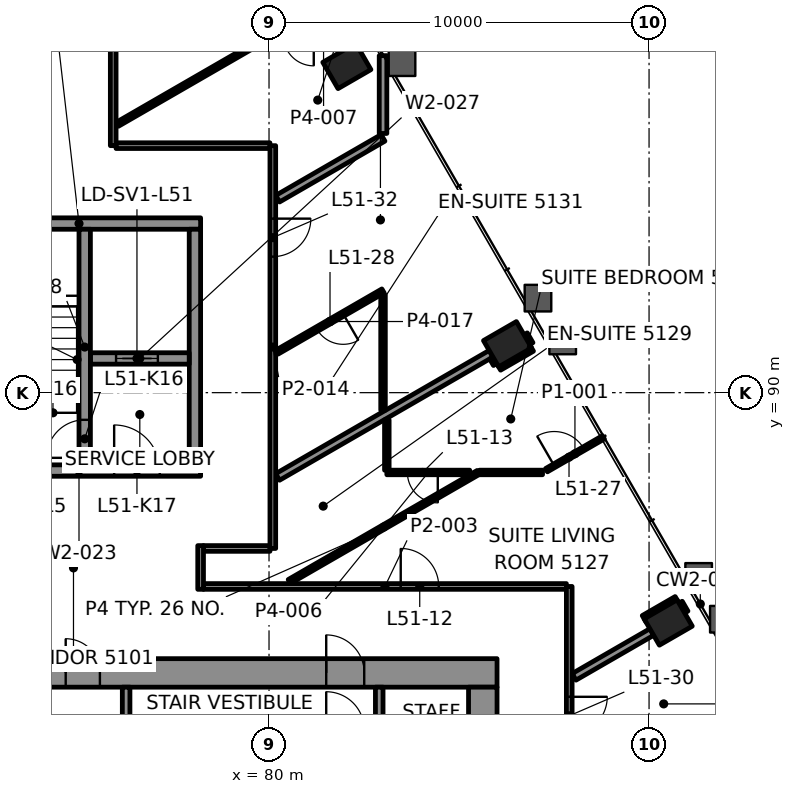
"""IFC4 building model, lengths in metres.
Left out: names, types, materials, properties, quantities, classifications, styles, units other than length and angle.
Written with IfcOpenShell. Run it as: python <this file> out.ifc"""

import sys

from ifc_helpers import new_model, si_unit, direction, frame, frame_2d, origin, origin_2d, place, context, subcontext, project, spatial, rectangle, hollow_rectangle, extrude, element, fill, save


model = new_model("IFC4")
c1 = context("Model", 3, precision=1e-05, world=origin(), true_north=direction((0.0, 1.0)))
c2 = subcontext(c1, "Body", "Model", "MODEL_VIEW")
j1 = project(units=[si_unit("LENGTHUNIT", "METRE"), si_unit("PLANEANGLEUNIT", "RADIAN")], contexts=[c1])
p1 = place(None, origin())
s1 = spatial("IfcSite", under=j1, at=p1, CompositionType="ELEMENT")
p2 = place(p1, origin())
s2 = spatial("IfcBuilding", under=s1, at=p2, CompositionType="ELEMENT")
p3 = place(p2, frame((0.0, 0.0, 218.2)))
s3 = spatial("IfcBuildingStorey", under=s2, at=p3, CompositionType="ELEMENT", Elevation=218.2)
for number, where, z_axis, x_axis in (
    (1, (90.504, 83.951, -0.0), (0.0, 0.0, 1.0), (-0.5, 0.866, 0.0)),
    (2, (86.276, 91.274, -0.0), (0.0, 0.0, 1.0), (-0.5, 0.866, 0.0)),
    (3, (82.048, 98.597, -0.0), (0.0, 0.0, 1.0), (-0.5, 0.866, 0.0)),
):
    element("IfcColumn", number, at=place(p3, frame(where, z_axis=z_axis, x_axis=x_axis)), inside=s3, PredefinedType="COLUMN", context=c2, shape_type="SweptSolid", body=[
        extrude(hollow_rectangle(XDim=0.8, YDim=1.0, WallThickness=0.05, at=origin_2d()), origin(), (0.0, 0.0, 1.0), 3.9),
    ])
p4 = place(p3, frame((64.0, 82.625, 0.0), z_axis=(0.0, 0.0, 1.0), x_axis=(1.0, 0.0, 0.0)))
e4 = element("IfcWall", 4, at=p4, inside=s3, PredefinedType="SHEAR", context=c2, shape_type="SweptSolid", body=[
    extrude(rectangle(XDim=22.0, YDim=0.75, at=frame_2d((11.0, 0.0))), origin(), (0.0, 0.0, 1.0), 3.7),
])
p5 = place(p4, frame((3.695, 0.0, 0.0)))
e5 = element("IfcOpeningElement", 5, at=p5, cuts=e4, PredefinedType="OPENING", context=c2, shape_type="SweptSolid", body=[
    extrude(rectangle(XDim=1.0, YDim=2.1, at=frame_2d((0.5, 1.05))), frame((0.0, 0.385, 0.0), z_axis=(0.0, -1.0, 0.0), x_axis=(1.0, 0.0, 0.0)), (0.0, 0.0, 1.0), 0.77),
])
p6 = place(p4, frame((17.505, 0.0, 0.0)))
e6 = element("IfcOpeningElement", 6, at=p6, cuts=e4, PredefinedType="OPENING", context=c2, shape_type="SweptSolid", body=[
    extrude(rectangle(XDim=1.0, YDim=2.1, at=frame_2d((0.5, 1.05))), frame((0.0, 0.385, 0.0), z_axis=(0.0, -1.0, 0.0), x_axis=(1.0, 0.0, 0.0)), (0.0, 0.0, 1.0), 0.77),
])
p7 = place(p4, frame((10.65, 0.0, 0.0)))
e7 = element("IfcOpeningElement", 7, at=p7, cuts=e4, PredefinedType="OPENING", context=c2, shape_type="SweptSolid", body=[
    extrude(rectangle(XDim=0.9, YDim=2.1, at=frame_2d((0.45, 1.05))), frame((0.0, 0.385, 0.0), z_axis=(0.0, -1.0, 0.0), x_axis=(1.0, 0.0, 0.0)), (0.0, 0.0, 1.0), 0.77),
])
p8 = place(p3, frame((85.625, 67.75, 0.0), z_axis=(0.0, 0.0, 1.0), x_axis=(0.0, 1.0, 0.0)))
e8 = element("IfcWall", 8, at=p8, inside=s3, PredefinedType="SHEAR", context=c2, shape_type="SweptSolid", body=[
    extrude(rectangle(XDim=14.5, YDim=0.75, at=frame_2d((7.25, 0.0))), origin(), (0.0, 0.0, 1.0), 3.7),
])
p9 = place(p8, frame((4.65, 0.0, 0.0)))
e9 = element("IfcOpeningElement", 9, at=p9, cuts=e8, PredefinedType="OPENING", context=c2, shape_type="SweptSolid", body=[
    extrude(rectangle(XDim=1.8, YDim=2.1, at=frame_2d((0.9, 1.05))), frame((0.0, 0.385, 0.0), z_axis=(0.0, -1.0, 0.0), x_axis=(1.0, 0.0, 0.0)), (0.0, 0.0, 1.0), 0.77),
])
p10 = place(p8, frame((11.8, 0.0, 0.0)))
e10 = element("IfcOpeningElement", 10, at=p10, cuts=e8, PredefinedType="OPENING", context=c2, shape_type="SweptSolid", body=[
    extrude(rectangle(XDim=0.9, YDim=2.1, at=frame_2d((0.45, 1.05))), frame((0.0, 0.385, 0.0), z_axis=(0.0, -1.0, 0.0), x_axis=(1.0, 0.0, 0.0)), (0.0, 0.0, 1.0), 0.77),
])
p11 = place(p3, frame((71.8, 87.95, 0.0), z_axis=(0.0, 0.0, 1.0), x_axis=(1.0, 0.0, 0.0)))
e11 = element("IfcWall", 11, at=p11, inside=s3, PredefinedType="SHEAR", context=c2, shape_type="SweptSolid", body=[
    extrude(rectangle(XDim=6.4, YDim=0.3, at=frame_2d((3.2, 0.0))), origin(), (0.0, 0.0, 1.0), 3.7),
])
p12 = place(p11, frame((1.325, 0.0, 0.0)))
e12 = element("IfcOpeningElement", 12, at=p12, cuts=e11, PredefinedType="OPENING", context=c2, shape_type="SweptSolid", body=[
    extrude(rectangle(XDim=1.0, YDim=2.1, at=frame_2d((0.5, 1.05))), frame((0.0, 0.16, 0.0), z_axis=(0.0, -1.0, 0.0), x_axis=(1.0, 0.0, 0.0)), (0.0, 0.0, 1.0), 0.32),
])
p13 = place(p11, frame((4.125, 0.0, 0.0)))
e13 = element("IfcOpeningElement", 13, at=p13, cuts=e11, PredefinedType="OPENING", context=c2, shape_type="SweptSolid", body=[
    extrude(rectangle(XDim=1.2, YDim=2.1, at=frame_2d((0.6, 1.05))), frame((0.0, 0.16, 0.0), z_axis=(0.0, -1.0, 0.0), x_axis=(1.0, 0.0, 0.0)), (0.0, 0.0, 1.0), 0.32),
])
p14 = place(p3, frame((71.8, 94.45, 0.0), z_axis=(0.0, 0.0, 1.0), x_axis=(1.0, 0.0, 0.0)))
e14 = element("IfcWall", 14, at=p14, inside=s3, PredefinedType="SHEAR", context=c2, shape_type="SweptSolid", body=[
    extrude(rectangle(XDim=6.4, YDim=0.3, at=frame_2d((3.2, 0.0))), origin(), (0.0, 0.0, 1.0), 3.7),
])
p15 = place(p3, frame((78.05, 88.1, 0.0), z_axis=(0.0, 0.0, 1.0), x_axis=(0.0, 1.0, 0.0)))
e15 = element("IfcWall", 15, at=p15, inside=s3, PredefinedType="SHEAR", context=c2, shape_type="SweptSolid", body=[
    extrude(rectangle(XDim=6.2, YDim=0.3, at=frame_2d((3.1, 0.0))), origin(), (0.0, 0.0, 1.0), 3.7),
])
p16 = place(p3, frame((75.3, 90.9, 0.0), z_axis=(0.0, 0.0, 1.0), x_axis=(1.0, 0.0, 0.0)))
e16 = element("IfcWall", 16, at=p16, inside=s3, PredefinedType="SHEAR", context=c2, shape_type="SweptSolid", body=[
    extrude(rectangle(XDim=2.6, YDim=0.3, at=frame_2d((1.3, 0.0))), origin(), (0.0, 0.0, 1.0), 3.7),
])
p17 = place(p16, frame((0.675, 0.0, 0.0)))
e17 = element("IfcOpeningElement", 17, at=p17, cuts=e16, PredefinedType="OPENING", context=c2, shape_type="SweptSolid", body=[
    extrude(rectangle(XDim=1.1, YDim=2.1, at=frame_2d((0.55, 1.05))), frame((0.0, 0.16, 0.0), z_axis=(0.0, -1.0, 0.0), x_axis=(1.0, 0.0, 0.0)), (0.0, 0.0, 1.0), 0.32),
])
p18 = place(p3, frame((75.15, 88.1, 0.0), z_axis=(0.0, 0.0, 1.0), x_axis=(0.0, 1.0, 0.0)))
e18 = element("IfcWall", 18, at=p18, inside=s3, PredefinedType="SHEAR", context=c2, shape_type="SweptSolid", body=[
    extrude(rectangle(XDim=6.2, YDim=0.3, at=frame_2d((3.1, 0.0))), origin(), (0.0, 0.0, 1.0), 3.7),
])
p19 = place(p18, frame((0.185, 0.0, 0.0)))
e19 = element("IfcOpeningElement", 19, at=p19, cuts=e18, PredefinedType="OPENING", context=c2, shape_type="SweptSolid", body=[
    extrude(rectangle(XDim=1.0, YDim=2.1, at=frame_2d((0.5, 1.05))), frame((0.0, 0.16, 0.0), z_axis=(0.0, -1.0, 0.0), x_axis=(1.0, 0.0, 0.0)), (0.0, 0.0, 1.0), 0.32),
])
p20 = place(p3, frame((78.275, 84.9, 0.0), z_axis=(0.0, 0.0, 1.0), x_axis=(1.0, 0.0, 0.0)))
e20 = element("IfcWall", 20, at=p20, inside=s3, PredefinedType="PARTITIONING", context=c2, shape_type="SweptSolid", body=[
    extrude(rectangle(XDim=9.55, YDim=0.15, at=frame_2d((4.775, 0.0))), origin(), (0.0, 0.0, 1.0), 3.097),
])
p21 = place(p20, frame((5.191, 0.0, 0.0)))
e21 = element("IfcOpeningElement", 21, at=p21, cuts=e20, PredefinedType="OPENING", context=c2, shape_type="SweptSolid", body=[
    extrude(rectangle(XDim=1.0, YDim=2.1, at=frame_2d((0.5, 1.05))), frame((0.0, 0.085, 0.0), z_axis=(0.0, -1.0, 0.0), x_axis=(1.0, 0.0, 0.0)), (0.0, 0.0, 1.0), 0.17),
])
p22 = place(p3, frame((78.275, 85.9, 0.0), z_axis=(0.0, 0.0, 1.0), x_axis=(1.0, 0.0, 0.0)))
e22 = element("IfcWall", 22, at=p22, inside=s3, PredefinedType="PARTITIONING", context=c2, shape_type="SweptSolid", body=[
    extrude(rectangle(XDim=1.75, YDim=0.15, at=frame_2d((0.875, 0.0))), origin(), (0.0, 0.0, 1.0), 3.097),
])
p23 = place(p3, frame((85.281, 87.9, 0.0), z_axis=(0.0, 0.0, 1.0), x_axis=(-1.0, 0.0, 0.0)))
e23 = element("IfcWall", 23, at=p23, inside=s3, PredefinedType="PARTITIONING", context=c2, shape_type="SweptSolid", body=[
    extrude(rectangle(XDim=2.181, YDim=0.12, at=frame_2d((1.091, 0.0))), origin(), (0.0, 0.0, 1.0), 3.097),
])
p24 = place(p23, frame((0.841, 0.0, 0.0)))
e24 = element("IfcOpeningElement", 24, at=p24, cuts=e23, PredefinedType="OPENING", context=c2, shape_type="SweptSolid", body=[
    extrude(rectangle(XDim=0.8, YDim=2.1, at=frame_2d((0.4, 1.05))), frame((0.0, 0.07, 0.0), z_axis=(0.0, -1.0, 0.0), x_axis=(1.0, 0.0, 0.0)), (0.0, 0.0, 1.0), 0.14),
])
p25 = place(p3, frame((75.975, 96.5, 0.0), z_axis=(0.0, 0.0, 1.0), x_axis=(1.0, 0.0, 0.0)))
e25 = element("IfcWall", 25, at=p25, inside=s3, PredefinedType="PARTITIONING", context=c2, shape_type="SweptSolid", body=[
    extrude(rectangle(XDim=4.049, YDim=0.15, at=frame_2d((2.025, 0.0))), origin(), (0.0, 0.0, 1.0), 3.1),
])
p26 = place(p3, frame((88.027, 82.521, 0.0), z_axis=(0.0, 0.0, 1.0), x_axis=(0.866032292145, 0.49998806882, 0.0)))
e26 = element("IfcWall", 26, at=p26, inside=s3, PredefinedType="PARTITIONING", context=c2, shape_type="SweptSolid", body=[
    extrude(rectangle(XDim=2.36, YDim=0.2, at=frame_2d((1.18, 0.0))), origin(), (0.0, 0.0, 1.0), 3.1),
])
p27 = place(p3, frame((89.871, 84.048, 0.0), z_axis=(0.0, 0.0, 1.0), x_axis=(0.866010750942, 0.50002537861, 0.0)))
e27 = element("IfcWall", 27, at=p27, inside=s3, PredefinedType="PARTITIONING", context=c2, shape_type="SweptSolid", body=[
    extrude(rectangle(XDim=1.0, YDim=0.2, at=frame_2d((0.5, 0.0))), origin(), (0.0, 0.0, 1.0), 3.022),
])
p28 = place(p3, frame((87.301, 87.96, 0.0), z_axis=(0.0, 0.0, 1.0), x_axis=(0.866002256377, 0.500040090343, 0.0)))
e28 = element("IfcWall", 28, at=p28, inside=s3, PredefinedType="PARTITIONING", context=c2, shape_type="SweptSolid", body=[
    extrude(rectangle(XDim=1.73, YDim=0.1, at=frame_2d((0.865, 0.0))), origin(), (0.0, 0.0, 1.0), 3.022),
])
p29 = place(p28, frame((0.235, 0.0, 0.0)))
e29 = element("IfcOpeningElement", 29, at=p29, cuts=e28, PredefinedType="OPENING", context=c2, shape_type="SweptSolid", body=[
    extrude(rectangle(XDim=0.9, YDim=2.1, at=frame_2d((0.45, 1.05))), frame((0.0, 0.06, 0.0), z_axis=(0.0, -1.0, 0.0), x_axis=(1.0, 0.0, 0.0)), (0.0, 0.0, 1.0), 0.12),
])
p30 = place(p3, frame((80.534, 85.03, 0.0), z_axis=(0.0, 0.0, 1.0), x_axis=(0.866014884179, 0.500018220049, 0.0)))
e30 = element("IfcWall", 30, at=p30, inside=s3, PredefinedType="PARTITIONING", context=c2, shape_type="SweptSolid", body=[
    extrude(rectangle(XDim=5.74, YDim=0.12, at=frame_2d((2.87, 0.0))), origin(), (0.0, 0.0, 1.0), 3.1),
])
p31 = place(p3, frame((86.043, 90.678, 0.0), z_axis=(0.0, 0.0, 1.0), x_axis=(0.866039090965, 0.499976292358, 0.0)))
e31 = element("IfcWall", 31, at=p31, inside=s3, PredefinedType="PARTITIONING", context=c2, shape_type="SweptSolid", body=[
    extrude(rectangle(XDim=0.999, YDim=0.2, at=frame_2d((0.5, 0.0))), origin(), (0.0, 0.0, 1.0), 3.022),
])
p32 = place(p3, frame((80.227, 87.782, 0.0), z_axis=(0.0, 0.0, 1.0), x_axis=(0.866028841934, 0.499994044904, 0.0)))
e32 = element("IfcWall", 32, at=p32, inside=s3, PredefinedType="PARTITIONING", context=c2, shape_type="SweptSolid", body=[
    extrude(rectangle(XDim=6.484, YDim=0.2, at=frame_2d((3.242, 0.0))), origin(), (0.0, 0.0, 1.0), 3.1),
])
p33 = place(p3, frame((83.0, 92.677, 0.0), z_axis=(0.0, 0.0, 1.0), x_axis=(-0.866029130051, -0.499993545862, 0.0)))
e33 = element("IfcWall", 33, at=p33, inside=s3, PredefinedType="PARTITIONING", context=c2, shape_type="SweptSolid", body=[
    extrude(rectangle(XDim=3.222, YDim=0.12, at=frame_2d((1.611, 0.0))), origin(), (0.0, 0.0, 1.0), 3.1),
])
p34 = place(p33, frame((1.211, 0.0, 0.0)))
e34 = element("IfcOpeningElement", 34, at=p34, cuts=e33, PredefinedType="OPENING", context=c2, shape_type="SweptSolid", body=[
    extrude(rectangle(XDim=0.8, YDim=2.1, at=frame_2d((0.4, 1.05))), frame((0.0, 0.07, 0.0), z_axis=(0.0, -1.0, 0.0), x_axis=(1.0, 0.0, 0.0)), (0.0, 0.0, 1.0), 0.14),
])
p35 = place(p3, frame((80.227, 95.104, 0.0), z_axis=(0.0, 0.0, 1.0), x_axis=(0.866029421769, 0.499993040581, 0.0)))
e35 = element("IfcWall", 35, at=p35, inside=s3, PredefinedType="PARTITIONING", context=c2, shape_type="SweptSolid", body=[
    extrude(rectangle(XDim=3.202, YDim=0.2, at=frame_2d((1.601, 0.0))), origin(), (0.0, 0.0, 1.0), 3.022),
])
p36 = place(p3, frame((76.01, 97.063, 0.0), z_axis=(0.0, 0.0, 1.0), x_axis=(0.866045536992, 0.499965126639, 0.0)))
e36 = element("IfcWall", 36, at=p36, inside=s3, PredefinedType="PARTITIONING", context=c2, shape_type="SweptSolid", body=[
    extrude(rectangle(XDim=4.674, YDim=0.12, at=frame_2d((2.337, 0.0))), origin(), (0.0, 0.0, 1.0), 3.1),
])
p37 = place(p3, frame((87.9, 84.9, 0.0), z_axis=(0.0, 0.0, 1.0), x_axis=(0.0, -1.0, 0.0)))
e37 = element("IfcWall", 37, at=p37, inside=s3, PredefinedType="PARTITIONING", context=c2, shape_type="SweptSolid", body=[
    extrude(rectangle(XDim=16.309, YDim=0.15, at=frame_2d((8.154, 0.0))), origin(), (0.0, 0.0, 1.0), 3.1),
])
p38 = place(p37, frame((2.904, 0.0, 0.0)))
e38 = element("IfcOpeningElement", 38, at=p38, cuts=e37, PredefinedType="OPENING", context=c2, shape_type="SweptSolid", body=[
    extrude(rectangle(XDim=1.0, YDim=2.1, at=frame_2d((0.5, 1.05))), frame((0.0, 0.085, 0.0), z_axis=(0.0, -1.0, 0.0), x_axis=(1.0, 0.0, 0.0)), (0.0, 0.0, 1.0), 0.17),
])
p39 = place(p37, frame((10.227, 0.0, 0.0)))
e39 = element("IfcOpeningElement", 39, at=p39, cuts=e37, PredefinedType="OPENING", context=c2, shape_type="SweptSolid", body=[
    extrude(rectangle(XDim=1.0, YDim=2.1, at=frame_2d((0.5, 1.05))), frame((0.0, 0.085, 0.0), z_axis=(0.0, -1.0, 0.0), x_axis=(1.0, 0.0, 0.0)), (0.0, 0.0, 1.0), 0.17),
])
p40 = place(p3, frame((83.1, 87.96, 0.0), z_axis=(0.0, 0.0, 1.0), x_axis=(0.0, 1.0, 0.0)))
e40 = element("IfcWall", 40, at=p40, inside=s3, PredefinedType="PARTITIONING", context=c2, shape_type="SweptSolid", body=[
    extrude(rectangle(XDim=1.325, YDim=0.12, at=frame_2d((0.663, 0.0))), origin(), (0.0, 0.0, 1.0), 3.1),
])
p41 = place(p3, frame((83.0, 89.538, 0.0), z_axis=(0.0, 0.0, 1.0), x_axis=(0.0, 1.0, 0.0)))
e41 = element("IfcWall", 41, at=p41, inside=s3, PredefinedType="PARTITIONING", context=c2, shape_type="SweptSolid", body=[
    extrude(rectangle(XDim=3.031, YDim=0.12, at=frame_2d((1.515, 0.0))), origin(), (0.0, 0.0, 1.0), 3.1),
])
p42 = place(p3, frame((83.0, 96.821, 0.0), z_axis=(0.0, 0.0, 1.0), x_axis=(0.0, 1.0, 0.0)))
e42 = element("IfcWall", 42, at=p42, inside=s3, PredefinedType="PARTITIONING", context=c2, shape_type="SweptSolid", body=[
    extrude(rectangle(XDim=2.048, YDim=0.2, at=frame_2d((1.024, 0.0))), origin(), (0.0, 0.0, 1.0), 3.022),
])
p43 = place(p3, frame((80.1, 96.5, 0.0), z_axis=(0.0, 0.0, 1.0), x_axis=(0.0, -1.0, 0.0)))
e43 = element("IfcWall", 43, at=p43, inside=s3, PredefinedType="PARTITIONING", context=c2, shape_type="SweptSolid", body=[
    extrude(rectangle(XDim=10.6, YDim=0.15, at=frame_2d((5.3, 0.0))), origin(), (0.0, 0.0, 1.0), 3.097),
])
p44 = place(p43, frame((1.92, 0.0, 0.0)))
e44 = element("IfcOpeningElement", 44, at=p44, cuts=e43, PredefinedType="OPENING", context=c2, shape_type="SweptSolid", body=[
    extrude(rectangle(XDim=1.0, YDim=2.1, at=frame_2d((0.5, 1.05))), frame((0.0, 0.085, 0.0), z_axis=(0.0, -1.0, 0.0), x_axis=(1.0, 0.0, 0.0)), (0.0, 0.0, 1.0), 0.17),
])
p45 = place(p3, frame((78.2, 84.825, 0.0), z_axis=(0.0, 0.0, 1.0), x_axis=(0.0, 1.0, 0.0)))
e45 = element("IfcWall", 45, at=p45, inside=s3, PredefinedType="PARTITIONING", context=c2, shape_type="SweptSolid", body=[
    extrude(rectangle(XDim=1.15, YDim=0.15, at=frame_2d((0.575, 0.0))), origin(), (0.0, 0.0, 1.0), 3.1),
])
p46 = place(p3, frame((75.9, 103.169, 0.0), z_axis=(0.0, 0.0, 1.0), x_axis=(0.0, -1.0, 0.0)))
e46 = element("IfcWall", 46, at=p46, inside=s3, PredefinedType="PARTITIONING", context=c2, shape_type="SweptSolid", body=[
    extrude(rectangle(XDim=6.669, YDim=0.15, at=frame_2d((3.334, 0.0))), origin(), (0.0, 0.0, 1.0), 3.1),
])
p47 = place(p46, frame((1.452, 0.0, 0.0)))
e47 = element("IfcOpeningElement", 47, at=p47, cuts=e46, PredefinedType="OPENING", context=c2, shape_type="SweptSolid", body=[
    extrude(rectangle(XDim=1.0, YDim=2.1, at=frame_2d((0.5, 1.05))), frame((0.0, 0.085, 0.0), z_axis=(0.0, -1.0, 0.0), x_axis=(1.0, 0.0, 0.0)), (0.0, 0.0, 1.0), 0.17),
])
p48 = place(p3, frame((90.937, 84.201, 0.0), z_axis=(0.0, 0.0, 1.0), x_axis=(-0.500074377092, 0.865982457891, 0.0)))
e48 = element("IfcWall", 48, at=p48, inside=s3, PredefinedType="PARTITIONING", context=c2, shape_type="SweptSolid", body=[
    extrude(rectangle(XDim=0.3, YDim=0.2, at=frame_2d((0.15, 0.0))), origin(), (0.0, 0.0, 1.0), 3.1),
])
p49 = place(p3, frame((86.859, 91.264, 0.0), z_axis=(0.0, 0.0, 1.0), x_axis=(-0.500264001326, 0.865872928886, 0.0)))
e49 = element("IfcWall", 49, at=p49, inside=s3, PredefinedType="PARTITIONING", context=c2, shape_type="SweptSolid", body=[
    extrude(rectangle(XDim=0.299, YDim=0.2, at=frame_2d((0.149, 0.0))), origin(), (0.0, 0.0, 1.0), 3.1),
])
p50 = place(p3, frame((85.993, 90.764, 0.0), z_axis=(0.0, 0.0, 1.0), x_axis=(-0.500359323436, 0.865817848887, 0.0)))
e50 = element("IfcWall", 50, at=p50, inside=s3, PredefinedType="PARTITIONING", context=c2, shape_type="SweptSolid", body=[
    extrude(rectangle(XDim=0.199, YDim=0.2, at=frame_2d((0.1, 0.0))), origin(), (0.0, 0.0, 1.0), 3.1),
])
p51 = place(p3, frame((85.535, 87.9, 0.0), z_axis=(0.0, 0.0, 1.0), x_axis=(1.0, 0.0, 0.0)))
e51 = element("IfcWall", 51, at=p51, inside=s3, PredefinedType="PARTITIONING", context=c2, shape_type="SweptSolid", body=[
    extrude(rectangle(XDim=1.661, YDim=0.12, at=frame_2d((0.831, 0.0))), origin(), (0.0, 0.0, 1.0), 3.1),
])
for number, where, z_axis, x_axis in (
    (52, (76.24, 81.28, 0.0), (0.0, 0.0, 1.0), (0.0, 1.0, 0.0)),
    (53, (82.9, 81.28, 0.0), (0.0, 0.0, 1.0), (0.0, 1.0, 0.0)),
):
    element("IfcWall", number, at=place(p3, frame(where, z_axis=z_axis, x_axis=x_axis)), inside=s3, PredefinedType="PARTITIONING", context=c2, shape_type="SweptSolid", body=[
        extrude(rectangle(XDim=0.97, YDim=0.2, at=frame_2d((0.485, 0.0))), origin(), (0.0, 0.0, 1.0), 3.7),
    ])
p52 = place(p21, origin())
e54 = element("IfcDoor", 54, at=p52, inside=s3, OperationType="SINGLE_SWING_RIGHT", PredefinedType="DOOR", context=c2, shape_type="SweptSolid", body=[
    extrude(rectangle(XDim=1.0, YDim=2.1, at=frame_2d((0.5, 1.05))), frame((0.0, 0.025, 0.0), z_axis=(0.0, -1.0, 0.0), x_axis=(1.0, 0.0, 0.0)), (0.0, 0.0, 1.0), 0.05),
])
fill(e21, e54)
p53 = place(p24, origin())
e55 = element("IfcDoor", 55, at=p53, inside=s3, OperationType="SINGLE_SWING_LEFT", PredefinedType="DOOR", context=c2, shape_type="SweptSolid", body=[
    extrude(rectangle(XDim=0.8, YDim=2.1, at=frame_2d((0.4, 1.05))), frame((0.0, 0.025, 0.0), z_axis=(0.0, -1.0, 0.0), x_axis=(1.0, 0.0, 0.0)), (0.0, 0.0, 1.0), 0.05),
])
fill(e24, e55)
p54 = place(p29, origin())
e56 = element("IfcDoor", 56, at=p54, inside=s3, OperationType="SINGLE_SWING_LEFT", PredefinedType="DOOR", context=c2, shape_type="SweptSolid", body=[
    extrude(rectangle(XDim=0.9, YDim=2.1, at=frame_2d((0.45, 1.05))), frame((0.0, 0.025, 0.0), z_axis=(0.0, -1.0, 0.0), x_axis=(1.0, 0.0, 0.0)), (0.0, 0.0, 1.0), 0.05),
])
fill(e29, e56)
p55 = place(p34, origin())
e57 = element("IfcDoor", 57, at=p55, inside=s3, OperationType="SINGLE_SWING_LEFT", PredefinedType="DOOR", context=c2, shape_type="SweptSolid", body=[
    extrude(rectangle(XDim=0.8, YDim=2.1, at=frame_2d((0.4, 1.05))), frame((0.0, 0.025, 0.0), z_axis=(0.0, -1.0, 0.0), x_axis=(1.0, 0.0, 0.0)), (0.0, 0.0, 1.0), 0.05),
])
fill(e34, e57)
p56 = place(p38, origin())
e58 = element("IfcDoor", 58, at=p56, inside=s3, OperationType="SINGLE_SWING_LEFT", PredefinedType="DOOR", context=c2, shape_type="SweptSolid", body=[
    extrude(rectangle(XDim=1.0, YDim=2.1, at=frame_2d((0.5, 1.05))), frame((0.0, 0.025, 0.0), z_axis=(0.0, -1.0, 0.0), x_axis=(1.0, 0.0, 0.0)), (0.0, 0.0, 1.0), 0.05),
])
fill(e38, e58)
p57 = place(p44, origin())
e59 = element("IfcDoor", 59, at=p57, inside=s3, OperationType="SINGLE_SWING_RIGHT", PredefinedType="DOOR", context=c2, shape_type="SweptSolid", body=[
    extrude(rectangle(XDim=1.0, YDim=2.1, at=frame_2d((0.5, 1.05))), frame((0.0, 0.025, 0.0), z_axis=(0.0, -1.0, 0.0), x_axis=(1.0, 0.0, 0.0)), (0.0, 0.0, 1.0), 0.05),
])
fill(e44, e59)
p58 = place(p3, origin())
p59 = place(p58, frame((85.682, 94.254, 0.15), z_axis=(0.0, 0.0, 1.0), x_axis=(-0.5, 0.866025, 0.0)))
p60 = place(p59, origin())
e60 = element("IfcWindow", 60, at=p60, inside=s3, PartitioningType="SINGLE_PANEL", PredefinedType="WINDOW", context=c2, shape_type="SweptSolid", body=[
    extrude(rectangle(XDim=2.743, YDim=3.55, at=frame_2d((1.372, 1.775))), frame((0.0, 0.03, 0.0), z_axis=(0.0, -1.0, 0.0), x_axis=(1.0, 0.0, 0.0)), (0.0, 0.0, 1.0), 0.06),
])
p61 = place(p17, origin())
e61 = element("IfcDoor", 61, at=p61, inside=s3, OperationType="DOUBLE_DOOR_SLIDING", PredefinedType="DOOR", context=c2, shape_type="SweptSolid", body=[
    extrude(rectangle(XDim=1.1, YDim=2.1, at=frame_2d((0.55, 1.05))), frame((0.0, 0.025, 0.0), z_axis=(0.0, -1.0, 0.0), x_axis=(1.0, 0.0, 0.0)), (0.0, 0.0, 1.0), 0.05),
])
fill(e17, e61)
p62 = place(p6, origin())
e62 = element("IfcDoor", 62, at=p62, inside=s3, OperationType="SINGLE_SWING_LEFT", PredefinedType="DOOR", context=c2, shape_type="SweptSolid", body=[
    extrude(rectangle(XDim=1.0, YDim=2.1, at=frame_2d((0.5, 1.05))), frame((0.0, 0.095, 0.0), z_axis=(0.0, -1.0, 0.0), x_axis=(1.0, 0.0, 0.0)), (0.0, 0.0, 1.0), 0.19),
])
fill(e6, e62)
p63 = place(p19, origin())
e63 = element("IfcDoor", 63, at=p63, inside=s3, OperationType="SINGLE_SWING_LEFT", PredefinedType="DOOR", context=c2, shape_type="SweptSolid", body=[
    extrude(rectangle(XDim=1.0, YDim=2.1, at=frame_2d((0.5, 1.05))), frame((0.0, 0.025, 0.0), z_axis=(0.0, -1.0, 0.0), x_axis=(1.0, 0.0, 0.0)), (0.0, 0.0, 1.0), 0.05),
])
fill(e19, e63)
p64 = place(p13, origin())
e64 = element("IfcDoor", 64, at=p64, inside=s3, OperationType="SINGLE_SWING_RIGHT", PredefinedType="DOOR", context=c2, shape_type="SweptSolid", body=[
    extrude(rectangle(XDim=1.2, YDim=2.1, at=frame_2d((0.6, 1.05))), frame((0.0, 0.025, 0.0), z_axis=(0.0, -1.0, 0.0), x_axis=(1.0, 0.0, 0.0)), (0.0, 0.0, 1.0), 0.05),
])
fill(e13, e64)
p65 = place(p7, origin())
e65 = element("IfcDoor", 65, at=p65, inside=s3, OperationType="SINGLE_SWING_RIGHT", PredefinedType="DOOR", context=c2, shape_type="SweptSolid", body=[
    extrude(rectangle(XDim=0.9, YDim=2.1, at=frame_2d((0.45, 1.05))), frame((0.0, 0.095, 0.0), z_axis=(0.0, -1.0, 0.0), x_axis=(1.0, 0.0, 0.0)), (0.0, 0.0, 1.0), 0.19),
])
fill(e7, e65)
save(model, sys.argv[1])
